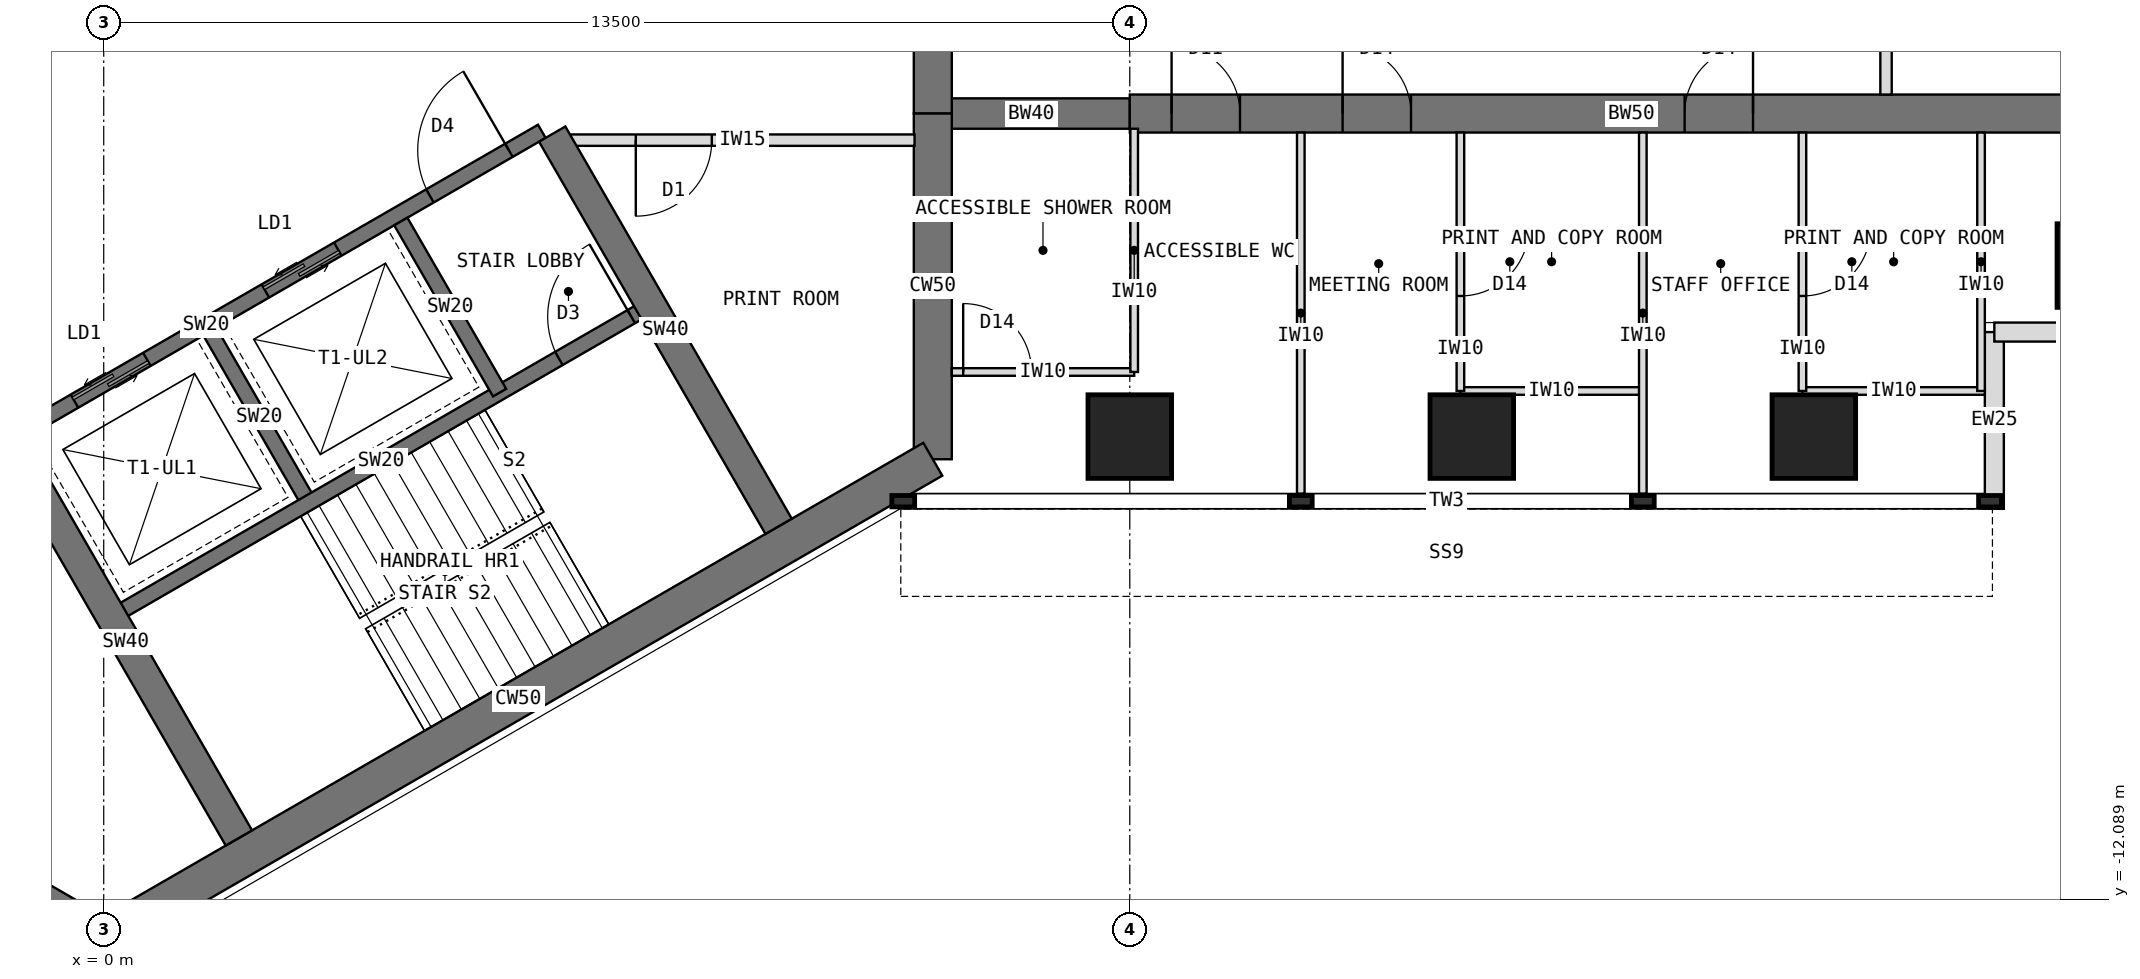
"""IFC4 building model, lengths in metres.
Left out: names, types, materials, properties, quantities, classifications, styles, units other than length and angle.
Written with IfcOpenShell. Run it as: python <this file> out.ifc"""

import sys

from ifc_helpers import new_model, si_unit, direction, frame, frame_2d, origin, origin_2d, place, context, subcontext, project, spatial, rectangle, extrude, element, fill, save


model = new_model("IFC4")
c1 = context("Model", 3, precision=1e-05, world=origin(), true_north=direction((0.0, 1.0)))
c2 = subcontext(c1, "Body", "Model", "MODEL_VIEW")
j1 = project(units=[si_unit("LENGTHUNIT", "METRE"), si_unit("PLANEANGLEUNIT", "RADIAN")], contexts=[c1])
p1 = place(None, origin())
s1 = spatial("IfcSite", under=j1, at=p1, CompositionType="ELEMENT")
p2 = place(p1, origin())
s2 = spatial("IfcBuilding", under=s1, at=p2, CompositionType="ELEMENT")
p3 = place(p2, frame((0.0, 0.0, 234.5)))
s3 = spatial("IfcBuildingStorey", under=s2, at=p3, CompositionType="ELEMENT", Elevation=234.5)
p4 = place(p3, frame((10.908, -6.298, 0.0), z_axis=(0.0, 0.0, 1.0), x_axis=(0.0, 1.0, 0.0)))
e1 = element("IfcWall", 1, at=p4, inside=s3, PredefinedType="SHEAR", context=c2, shape_type="SweptSolid", body=[
    extrude(rectangle(XDim=4.548, YDim=0.5, at=frame_2d((2.274, 0.0))), origin(), (0.0, 0.0, 1.0), 4.0),
])
p5 = place(p3, frame((10.908, -1.75, 0.0), z_axis=(0.0, 0.0, 1.0), x_axis=(0.0, 1.0, 0.0)))
e2 = element("IfcWall", 2, at=p5, inside=s3, PredefinedType="SHEAR", context=c2, shape_type="SweptSolid", body=[
    extrude(rectangle(XDim=3.5, YDim=0.5, at=frame_2d((1.75, 0.0))), origin(), (0.0, 0.0, 1.0), 4.0),
])
p6 = place(p5, frame((0.85, 0.0, 0.0)))
e3 = element("IfcOpeningElement", 3, at=p6, cuts=e2, PredefinedType="OPENING", context=c2, shape_type="SweptSolid", body=[
    extrude(rectangle(XDim=1.8, YDim=2.1, at=frame_2d((0.9, 1.05))), frame((0.0, 0.26, 0.0), z_axis=(0.0, -1.0, 0.0), x_axis=(1.0, 0.0, 0.0)), (0.0, 0.0, 1.0), 0.52),
])
p7 = place(p3, frame((-3.939, -10.322, 0.0), z_axis=(0.0, 0.0, 1.0), x_axis=(0.866011268655, -0.500024481964, 0.0)))
e4 = element("IfcWall", 4, at=p7, inside=s3, PredefinedType="SHEAR", context=c2, shape_type="SweptSolid", body=[
    extrude(rectangle(XDim=4.548, YDim=0.5, at=frame_2d((2.274, 0.0))), origin(), (0.0, 0.0, 1.0), 4.0),
])
p8 = place(p3, frame((0.0, -12.596, 0.0), z_axis=(0.0, 0.0, 1.0), x_axis=(0.866021940709, 0.500005998175, 0.0)))
e5 = element("IfcWall", 5, at=p8, inside=s3, PredefinedType="SHEAR", context=c2, shape_type="SweptSolid", body=[
    extrude(rectangle(XDim=12.596, YDim=0.5, at=frame_2d((6.298, 0.0))), origin(), (0.0, 0.0, 1.0), 4.0),
])
p9 = place(p3, frame((10.908, -1.75, 0.0), z_axis=(0.0, 0.0, 1.0), x_axis=(1.0, 0.0, 0.0)))
e6 = element("IfcWall", 6, at=p9, inside=s3, PredefinedType="SHEAR", context=c2, shape_type="SweptSolid", body=[
    extrude(rectangle(XDim=2.592, YDim=0.4, at=frame_2d((1.296, 0.0))), origin(), (0.0, 0.0, 1.0), 4.0),
])
p10 = place(p3, frame((13.5, -1.75, 0.0), z_axis=(0.0, 0.0, 1.0), x_axis=(1.0, 0.0, 0.0)))
e7 = element("IfcWall", 7, at=p10, inside=s3, PredefinedType="SHEAR", context=c2, shape_type="SweptSolid", body=[
    extrude(rectangle(XDim=13.2, YDim=0.5, at=frame_2d((6.6, 0.0))), origin(), (0.0, 0.0, 1.0), 4.0),
])
p11 = place(p10, frame((0.55, 0.0, 0.0)))
e8 = element("IfcOpeningElement", 8, at=p11, cuts=e7, PredefinedType="OPENING", context=c2, shape_type="SweptSolid", body=[
    extrude(rectangle(XDim=0.9, YDim=2.1, at=frame_2d((0.45, 1.05))), frame((0.0, 0.26, 0.0), z_axis=(0.0, -1.0, 0.0), x_axis=(1.0, 0.0, 0.0)), (0.0, 0.0, 1.0), 0.52),
])
p12 = place(p10, frame((2.8, 0.0, 0.0)))
e9 = element("IfcOpeningElement", 9, at=p12, cuts=e7, PredefinedType="OPENING", context=c2, shape_type="SweptSolid", body=[
    extrude(rectangle(XDim=0.9, YDim=2.1, at=frame_2d((0.45, 1.05))), frame((0.0, 0.26, 0.0), z_axis=(0.0, -1.0, 0.0), x_axis=(1.0, 0.0, 0.0)), (0.0, 0.0, 1.0), 0.52),
])
p13 = place(p10, frame((7.3, 0.0, 0.0)))
e10 = element("IfcOpeningElement", 10, at=p13, cuts=e7, PredefinedType="OPENING", context=c2, shape_type="SweptSolid", body=[
    extrude(rectangle(XDim=0.9, YDim=2.1, at=frame_2d((0.45, 1.05))), frame((0.0, 0.26, 0.0), z_axis=(0.0, -1.0, 0.0), x_axis=(1.0, 0.0, 0.0)), (0.0, 0.0, 1.0), 0.52),
])
for number, where, z_axis, x_axis in (
    (11, (13.5, -6.0, 0.0), (0.0, 0.0, 1.0), (1.0, 0.0, 0.0)),
    (12, (18.0, -6.0, 0.0), (0.0, 0.0, 1.0), (1.0, 0.0, 0.0)),
    (13, (22.5, -6.0, 0.0), (0.0, 0.0, 1.0), (1.0, 0.0, 0.0)),
    (14, (26.25, -3.75, 0.0), (0.0, 0.0, 1.0), (1.0, 0.0, 0.0)),
):
    element("IfcColumn", number, at=place(p3, frame(where, z_axis=z_axis, x_axis=x_axis)), inside=s3, PredefinedType="COLUMN", context=c2, shape_type="SweptSolid", body=[
        extrude(rectangle(XDim=1.1, YDim=1.1, at=origin_2d()), origin(), (0.0, 0.0, 1.0), 4.0),
    ])
for number, where, z_axis, x_axis in (
    (15, (24.875, -6.95, 0.0), (0.0, 0.0, 1.0), (0.0, 1.0, 0.0)),
    (16, (24.875, -4.625, 0.0), (0.0, 0.0, 1.0), (1.0, 0.0, 0.0)),
):
    element("IfcWall", number, at=place(p3, frame(where, z_axis=z_axis, x_axis=x_axis)), inside=s3, PredefinedType="STANDARD", context=c2, shape_type="SweptSolid", body=[
        extrude(rectangle(XDim=2.325, YDim=0.25, at=frame_2d((1.163, 0.0))), origin(), (0.0, 0.0, 1.0), 3.7),
    ])
p14 = place(p3, frame((-1.164, -5.984, 0.0), z_axis=(0.0, 0.0, 1.0), x_axis=(0.866026010844, 0.49999894854, 0.0)))
e17 = element("IfcWall", 17, at=p14, inside=s3, PredefinedType="SHEAR", context=c2, shape_type="SweptSolid", body=[
    extrude(rectangle(XDim=8.0, YDim=0.2, at=frame_2d((4.0, 0.0))), origin(), (0.0, 0.0, 1.0), 4.0),
])
p15 = place(p14, frame((6.3, 0.0, 0.0)))
e18 = element("IfcOpeningElement", 18, at=p15, cuts=e17, PredefinedType="OPENING", context=c2, shape_type="SweptSolid", body=[
    extrude(rectangle(XDim=1.2, YDim=2.1, at=frame_2d((0.6, 1.05))), frame((0.0, 0.11, 0.0), z_axis=(0.0, -1.0, 0.0), x_axis=(1.0, 0.0, 0.0)), (0.0, 0.0, 1.0), 0.22),
])
p16 = place(p14, frame((0.9, 0.0, 0.0)))
e19 = element("IfcOpeningElement", 19, at=p16, cuts=e17, PredefinedType="OPENING", context=c2, shape_type="SweptSolid", body=[
    extrude(rectangle(XDim=1.1, YDim=2.2, at=frame_2d((0.55, 1.1))), frame((0.0, 0.11, 0.0), z_axis=(0.0, -1.0, 0.0), x_axis=(1.0, 0.0, 0.0)), (0.0, 0.0, 1.0), 0.22),
])
p17 = place(p14, frame((3.8, 0.0, 0.0)))
e20 = element("IfcOpeningElement", 20, at=p17, cuts=e17, PredefinedType="OPENING", context=c2, shape_type="SweptSolid", body=[
    extrude(rectangle(XDim=1.1, YDim=2.2, at=frame_2d((0.55, 1.1))), frame((0.0, 0.11, 0.0), z_axis=(0.0, -1.0, 0.0), x_axis=(1.0, 0.0, 0.0)), (0.0, 0.0, 1.0), 0.22),
])
p18 = place(p3, frame((1.397, -4.62, 0.0), z_axis=(0.0, 0.0, 1.0), x_axis=(0.499936506574, -0.866062058628, 0.0)))
e21 = element("IfcWall", 21, at=p18, inside=s3, PredefinedType="SHEAR", context=c2, shape_type="SweptSolid", body=[
    extrude(rectangle(XDim=2.6, YDim=0.2, at=frame_2d((1.3, 0.0))), origin(), (0.0, 0.0, 1.0), 4.0),
])
p19 = place(p3, frame((3.909, -3.17, 0.0), z_axis=(0.0, 0.0, 1.0), x_axis=(0.49997716683, -0.86603858612, 0.0)))
e22 = element("IfcWall", 22, at=p19, inside=s3, PredefinedType="SHEAR", context=c2, shape_type="SweptSolid", body=[
    extrude(rectangle(XDim=2.6, YDim=0.2, at=frame_2d((1.3, 0.0))), origin(), (0.0, 0.0, 1.0), 4.0),
])
p20 = place(p3, frame((0.186, -8.322, 0.0), z_axis=(0.0, 0.0, 1.0), x_axis=(0.866026010844, 0.49999894854, 0.0)))
e23 = element("IfcWall", 23, at=p20, inside=s3, PredefinedType="SHEAR", context=c2, shape_type="SweptSolid", body=[
    extrude(rectangle(XDim=8.0, YDim=0.2, at=frame_2d((4.0, 0.0))), origin(), (0.0, 0.0, 1.0), 4.0),
])
p21 = place(p20, frame((6.7, 0.0, 0.0)))
e24 = element("IfcOpeningElement", 24, at=p21, cuts=e23, PredefinedType="OPENING", context=c2, shape_type="SweptSolid", body=[
    extrude(rectangle(XDim=1.1, YDim=2.1, at=frame_2d((0.55, 1.05))), frame((0.0, 0.11, 0.0), z_axis=(0.0, -1.0, 0.0), x_axis=(1.0, 0.0, 0.0)), (0.0, 0.0, 1.0), 0.22),
])
p22 = place(p3, frame((5.901, -2.02, 0.0), z_axis=(0.0, 0.0, 1.0), x_axis=(0.500003832394, -0.86602319114, 0.0)))
e25 = element("IfcWall", 25, at=p22, inside=s3, PredefinedType="SHEAR", context=c2, shape_type="SweptSolid", body=[
    extrude(rectangle(XDim=5.958, YDim=0.4, at=frame_2d((2.979, 0.0))), origin(), (0.0, 0.0, 1.0), 4.0),
])
p23 = place(p3, frame((-1.201, -6.12, 0.0), z_axis=(0.0, 0.0, 1.0), x_axis=(0.500021575205, -0.866012946976, 0.0)))
e26 = element("IfcWall", 26, at=p23, inside=s3, PredefinedType="SHEAR", context=c2, shape_type="SweptSolid", body=[
    extrude(rectangle(XDim=5.958, YDim=0.4, at=frame_2d((2.979, 0.0))), origin(), (0.0, 0.0, 1.0), 4.0),
])
for number, where, z_axis, x_axis in (
    (27, (15.75, -2.0, 0.0), (0.0, 0.0, 1.0), (0.0, -1.0, 0.0)),
    (28, (20.25, -2.0, 0.0), (0.0, 0.0, 1.0), (0.0, -1.0, 0.0)),
):
    element("IfcWall", number, at=place(p3, frame(where, z_axis=z_axis, x_axis=x_axis)), inside=s3, PredefinedType="PARTITIONING", context=c2, shape_type="SweptSolid", body=[
        extrude(rectangle(XDim=4.75, YDim=0.1, at=frame_2d((2.375, 0.0))), origin(), (0.0, 0.0, 1.0), 3.7),
    ])
p24 = place(p3, frame((17.85, -5.4, 0.0), z_axis=(0.0, 0.0, 1.0), x_axis=(1.0, 0.0, 0.0)))
e29 = element("IfcWall", 29, at=p24, inside=s3, PredefinedType="PARTITIONING", context=c2, shape_type="SweptSolid", body=[
    extrude(rectangle(XDim=2.4, YDim=0.1, at=frame_2d((1.2, 0.0))), origin(), (0.0, 0.0, 1.0), 3.7),
])
p25 = place(p3, frame((17.85, -2.0, 0.0), z_axis=(0.0, 0.0, 1.0), x_axis=(0.0, -1.0, 0.0)))
e30 = element("IfcWall", 30, at=p25, inside=s3, PredefinedType="PARTITIONING", context=c2, shape_type="SweptSolid", body=[
    extrude(rectangle(XDim=3.4, YDim=0.1, at=frame_2d((1.7, 0.0))), origin(), (0.0, 0.0, 1.0), 3.7),
])
p26 = place(p25, frame((1.25, 0.0, 0.0)))
e31 = element("IfcOpeningElement", 31, at=p26, cuts=e30, PredefinedType="OPENING", context=c2, shape_type="SweptSolid", body=[
    extrude(rectangle(XDim=0.9, YDim=2.1, at=frame_2d((0.45, 1.05))), frame((0.0, 0.06, 0.0), z_axis=(0.0, -1.0, 0.0), x_axis=(1.0, 0.0, 0.0)), (0.0, 0.0, 1.0), 0.12),
])
p27 = place(p3, frame((22.35, -5.4, 0.0), z_axis=(0.0, 0.0, 1.0), x_axis=(1.0, 0.0, 0.0)))
e32 = element("IfcWall", 32, at=p27, inside=s3, PredefinedType="PARTITIONING", context=c2, shape_type="SweptSolid", body=[
    extrude(rectangle(XDim=2.4, YDim=0.1, at=frame_2d((1.2, 0.0))), origin(), (0.0, 0.0, 1.0), 3.7),
])
p28 = place(p3, frame((22.35, -2.0, 0.0), z_axis=(0.0, 0.0, 1.0), x_axis=(0.0, -1.0, 0.0)))
e33 = element("IfcWall", 33, at=p28, inside=s3, PredefinedType="PARTITIONING", context=c2, shape_type="SweptSolid", body=[
    extrude(rectangle(XDim=3.4, YDim=0.1, at=frame_2d((1.7, 0.0))), origin(), (0.0, 0.0, 1.0), 3.7),
])
p29 = place(p28, frame((1.25, 0.0, 0.0)))
e34 = element("IfcOpeningElement", 34, at=p29, cuts=e33, PredefinedType="OPENING", context=c2, shape_type="SweptSolid", body=[
    extrude(rectangle(XDim=0.9, YDim=2.1, at=frame_2d((0.45, 1.05))), frame((0.0, 0.06, 0.0), z_axis=(0.0, -1.0, 0.0), x_axis=(1.0, 0.0, 0.0)), (0.0, 0.0, 1.0), 0.12),
])
p30 = place(p3, frame((24.7, -2.0, 0.0), z_axis=(0.0, 0.0, 1.0), x_axis=(0.0, -1.0, 0.0)))
e35 = element("IfcWall", 35, at=p30, inside=s3, PredefinedType="PARTITIONING", context=c2, shape_type="SweptSolid", body=[
    extrude(rectangle(XDim=3.4, YDim=0.1, at=frame_2d((1.7, 0.0))), origin(), (0.0, 0.0, 1.0), 3.7),
])
p31 = place(p3, frame((11.158, -5.15, 0.0), z_axis=(0.0, 0.0, 1.0), x_axis=(1.0, 0.0, 0.0)))
e36 = element("IfcWall", 36, at=p31, inside=s3, PredefinedType="PARTITIONING", context=c2, shape_type="SweptSolid", body=[
    extrude(rectangle(XDim=2.4, YDim=0.1, at=frame_2d((1.2, 0.0))), origin(), (0.0, 0.0, 1.0), 3.7),
])
p32 = place(p31, frame((0.15, 0.0, 0.0)))
e37 = element("IfcOpeningElement", 37, at=p32, cuts=e36, PredefinedType="OPENING", context=c2, shape_type="SweptSolid", body=[
    extrude(rectangle(XDim=0.9, YDim=2.1, at=frame_2d((0.45, 1.05))), frame((0.0, 0.06, 0.0), z_axis=(0.0, -1.0, 0.0), x_axis=(1.0, 0.0, 0.0)), (0.0, 0.0, 1.0), 0.12),
])
p33 = place(p3, frame((13.558, -1.95, 0.0), z_axis=(0.0, 0.0, 1.0), x_axis=(0.0, -1.0, 0.0)))
e38 = element("IfcWall", 38, at=p33, inside=s3, PredefinedType="PARTITIONING", context=c2, shape_type="SweptSolid", body=[
    extrude(rectangle(XDim=3.2, YDim=0.1, at=frame_2d((1.6, 0.0))), origin(), (0.0, 0.0, 1.0), 3.167),
])
p34 = place(p3, frame((10.668, -2.1, 0.0), z_axis=(0.0, 0.0, 1.0), x_axis=(-1.0, 0.0, 0.0)))
e39 = element("IfcWall", 39, at=p34, inside=s3, PredefinedType="PARTITIONING", context=c2, shape_type="SweptSolid", body=[
    extrude(rectangle(XDim=4.526, YDim=0.15, at=frame_2d((2.263, 0.0))), origin(), (0.0, 0.0, 1.0), 3.7),
])
p35 = place(p34, frame((2.668, 0.0, 0.0)))
e40 = element("IfcOpeningElement", 40, at=p35, cuts=e39, PredefinedType="OPENING", context=c2, shape_type="SweptSolid", body=[
    extrude(rectangle(XDim=1.0, YDim=2.1, at=frame_2d((0.5, 1.05))), frame((0.0, 0.085, 0.0), z_axis=(0.0, -1.0, 0.0), x_axis=(1.0, 0.0, 0.0)), (0.0, 0.0, 1.0), 0.17),
])
p36 = place(p3, frame((23.45, -1.5, 0.0), z_axis=(0.0, 0.0, 1.0), x_axis=(0.0, 1.0, 0.0)))
e41 = element("IfcWall", 41, at=p36, inside=s3, PredefinedType="PARTITIONING", context=c2, shape_type="SweptSolid", body=[
    extrude(rectangle(XDim=3.0, YDim=0.15, at=frame_2d((1.5, 0.0))), origin(), (0.0, 0.0, 1.0), 3.7),
])
p37 = place(p36, frame((1.0, 0.0, 0.0)))
e42 = element("IfcOpeningElement", 42, at=p37, cuts=e41, PredefinedType="OPENING", context=c2, shape_type="SweptSolid", body=[
    extrude(rectangle(XDim=1.0, YDim=2.1, at=frame_2d((0.5, 1.05))), frame((0.0, 0.085, 0.0), z_axis=(0.0, -1.0, 0.0), x_axis=(1.0, 0.0, 0.0)), (0.0, 0.0, 1.0), 0.17),
])
p38 = place(p15, origin())
e43 = element("IfcDoor", 43, at=p38, inside=s3, OperationType="SINGLE_SWING_RIGHT", PredefinedType="DOOR", context=c2, shape_type="SweptSolid", body=[
    extrude(rectangle(XDim=1.2, YDim=2.1, at=frame_2d((0.6, 1.05))), frame((0.0, 0.025, 0.0), z_axis=(0.0, -1.0, 0.0), x_axis=(1.0, 0.0, 0.0)), (0.0, 0.0, 1.0), 0.05),
])
fill(e18, e43)
p39 = place(p16, origin())
e44 = element("IfcDoor", 44, at=p39, inside=s3, OperationType="DOUBLE_DOOR_SLIDING", PredefinedType="DOOR", context=c2, shape_type="SweptSolid", body=[
    extrude(rectangle(XDim=1.1, YDim=2.2, at=frame_2d((0.55, 1.1))), frame((0.0, 0.025, 0.0), z_axis=(0.0, -1.0, 0.0), x_axis=(1.0, 0.0, 0.0)), (0.0, 0.0, 1.0), 0.05),
])
fill(e19, e44)
p40 = place(p17, origin())
e45 = element("IfcDoor", 45, at=p40, inside=s3, OperationType="DOUBLE_DOOR_SLIDING", PredefinedType="DOOR", context=c2, shape_type="SweptSolid", body=[
    extrude(rectangle(XDim=1.1, YDim=2.2, at=frame_2d((0.55, 1.1))), frame((0.0, 0.025, 0.0), z_axis=(0.0, -1.0, 0.0), x_axis=(1.0, 0.0, 0.0)), (0.0, 0.0, 1.0), 0.05),
])
fill(e20, e45)
p41 = place(p21, origin())
e46 = element("IfcDoor", 46, at=p41, inside=s3, OperationType="SINGLE_SWING_RIGHT", PredefinedType="DOOR", context=c2, shape_type="SweptSolid", body=[
    extrude(rectangle(XDim=1.1, YDim=2.1, at=frame_2d((0.55, 1.05))), frame((0.0, 0.025, 0.0), z_axis=(0.0, -1.0, 0.0), x_axis=(1.0, 0.0, 0.0)), (0.0, 0.0, 1.0), 0.05),
])
fill(e24, e46)
p42 = place(p26, origin())
e47 = element("IfcDoor", 47, at=p42, inside=s3, OperationType="SINGLE_SWING_LEFT", PredefinedType="DOOR", context=c2, shape_type="SweptSolid", body=[
    extrude(rectangle(XDim=0.9, YDim=2.1, at=frame_2d((0.45, 1.05))), frame((0.0, 0.025, 0.0), z_axis=(0.0, -1.0, 0.0), x_axis=(1.0, 0.0, 0.0)), (0.0, 0.0, 1.0), 0.05),
])
fill(e31, e47)
p43 = place(p29, origin())
e48 = element("IfcDoor", 48, at=p43, inside=s3, OperationType="SINGLE_SWING_LEFT", PredefinedType="DOOR", context=c2, shape_type="SweptSolid", body=[
    extrude(rectangle(XDim=0.9, YDim=2.1, at=frame_2d((0.45, 1.05))), frame((0.0, 0.025, 0.0), z_axis=(0.0, -1.0, 0.0), x_axis=(1.0, 0.0, 0.0)), (0.0, 0.0, 1.0), 0.05),
])
fill(e34, e48)
p44 = place(p32, origin())
e49 = element("IfcDoor", 49, at=p44, inside=s3, OperationType="SINGLE_SWING_LEFT", PredefinedType="DOOR", context=c2, shape_type="SweptSolid", body=[
    extrude(rectangle(XDim=0.9, YDim=2.1, at=frame_2d((0.45, 1.05))), frame((0.0, 0.025, 0.0), z_axis=(0.0, -1.0, 0.0), x_axis=(1.0, 0.0, 0.0)), (0.0, 0.0, 1.0), 0.05),
])
fill(e37, e49)
p45 = place(p35, origin())
e50 = element("IfcDoor", 50, at=p45, inside=s3, OperationType="SINGLE_SWING_RIGHT", PredefinedType="DOOR", context=c2, shape_type="SweptSolid", body=[
    extrude(rectangle(XDim=1.0, YDim=2.1, at=frame_2d((0.5, 1.05))), frame((0.0, 0.025, 0.0), z_axis=(0.0, -1.0, 0.0), x_axis=(1.0, 0.0, 0.0)), (0.0, 0.0, 1.0), 0.05),
])
fill(e40, e50)
p46 = place(p11, origin())
e51 = element("IfcDoor", 51, at=p46, inside=s3, OperationType="SINGLE_SWING_LEFT", PredefinedType="DOOR", context=c2, shape_type="SweptSolid", body=[
    extrude(rectangle(XDim=0.9, YDim=2.1, at=frame_2d((0.45, 1.05))), frame((0.0, 0.025, 0.0), z_axis=(0.0, -1.0, 0.0), x_axis=(1.0, 0.0, 0.0)), (0.0, 0.0, 1.0), 0.05),
])
fill(e8, e51)
p47 = place(p12, origin())
e52 = element("IfcDoor", 52, at=p47, inside=s3, OperationType="SINGLE_SWING_LEFT", PredefinedType="DOOR", context=c2, shape_type="SweptSolid", body=[
    extrude(rectangle(XDim=0.9, YDim=2.1, at=frame_2d((0.45, 1.05))), frame((0.0, 0.025, 0.0), z_axis=(0.0, -1.0, 0.0), x_axis=(1.0, 0.0, 0.0)), (0.0, 0.0, 1.0), 0.05),
])
fill(e9, e52)
p48 = place(p13, origin())
e53 = element("IfcDoor", 53, at=p48, inside=s3, OperationType="SINGLE_SWING_RIGHT", PredefinedType="DOOR", context=c2, shape_type="SweptSolid", body=[
    extrude(rectangle(XDim=0.9, YDim=2.1, at=frame_2d((0.45, 1.05))), frame((0.0, 0.025, 0.0), z_axis=(0.0, -1.0, 0.0), x_axis=(1.0, 0.0, 0.0)), (0.0, 0.0, 1.0), 0.05),
])
fill(e10, e53)
save(model, sys.argv[1])
